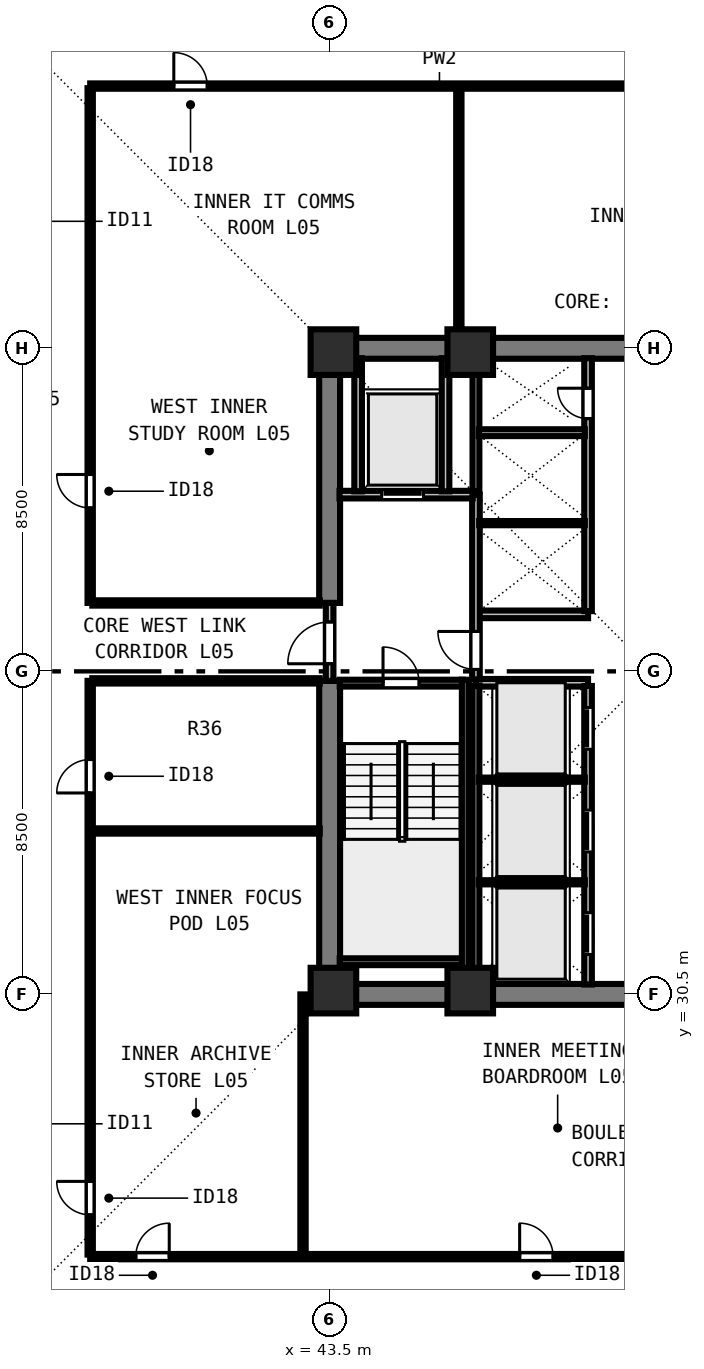
"""IFC4 building model, lengths in metres.
Left out: names, types, materials, properties, quantities, classifications, styles, units other than length and angle.
Written with IfcOpenShell. Run it as: python <this file> out.ifc"""

import sys

from ifc_helpers import new_model, si_unit, direction, frame, frame_2d, origin, origin_2d, place, context, subcontext, project, spatial, rectangle, extrude, element, fill, save


model = new_model("IFC4")
c1 = context("Model", 3, precision=1e-05, world=origin(), true_north=direction((0.0, 1.0)))
c2 = subcontext(c1, "Body", "Model", "MODEL_VIEW")
j1 = project(units=[si_unit("LENGTHUNIT", "METRE"), si_unit("PLANEANGLEUNIT", "RADIAN")], contexts=[c1])
p1 = place(None, origin())
s1 = spatial("IfcSite", under=j1, at=p1, CompositionType="ELEMENT")
p2 = place(p1, origin())
s2 = spatial("IfcBuilding", under=s1, at=p2, CompositionType="ELEMENT")
p3 = place(p2, frame((0.0, 0.0, 23.5)))
s3 = spatial("IfcBuildingStorey", under=s2, at=p3, CompositionType="ELEMENT", Elevation=23.5)
for number, where, z_axis, x_axis in (
    (1, (43.6, 30.6, 0.0), (0.0, 0.0, 1.0), (1.0, 0.0, 0.0)),
    (2, (47.2, 30.6, 0.0), (0.0, 0.0, 1.0), (1.0, 0.0, 0.0)),
    (3, (43.6, 47.4, 0.0), (0.0, 0.0, 1.0), (1.0, 0.0, 0.0)),
    (4, (47.2, 47.4, 0.0), (0.0, 0.0, 1.0), (1.0, 0.0, 0.0)),
):
    element("IfcColumn", number, at=place(p3, frame(where, z_axis=z_axis, x_axis=x_axis)), inside=s3, PredefinedType="COLUMN", context=c2, shape_type="SweptSolid", body=[
        extrude(rectangle(XDim=1.2, YDim=1.2, at=origin_2d()), origin(), (0.0, 0.0, 1.0), 3.5),
    ])
for number, where, z_axis, x_axis in (
    (5, (43.225, 30.5, 0.0), (0.0, 0.0, 1.0), (1.0, 0.0, 0.0)),
    (6, (43.225, 47.5, 0.0), (0.0, 0.0, 1.0), (1.0, 0.0, 0.0)),
):
    element("IfcWall", number, at=place(p3, frame(where, z_axis=z_axis, x_axis=x_axis)), inside=s3, PredefinedType="SHEAR", context=c2, shape_type="SweptSolid", body=[
        extrude(rectangle(XDim=17.55, YDim=0.55, at=frame_2d((8.775, 0.0))), origin(), (0.0, 0.0, 1.0), 3.28),
    ])
p4 = place(p3, frame((43.5, 30.765, 0.0), z_axis=(0.0, 0.0, 1.0), x_axis=(0.0, 1.0, 0.0)))
e7 = element("IfcWall", 7, at=p4, inside=s3, PredefinedType="SHEAR", context=c2, shape_type="SweptSolid", body=[
    extrude(rectangle(XDim=7.985, YDim=0.55, at=frame_2d((3.993, 0.0))), origin(), (0.0, 0.0, 1.0), 3.28),
])
p5 = place(p3, frame((43.5, 40.8, 0.0), z_axis=(0.0, 0.0, 1.0), x_axis=(0.0, 1.0, 0.0)))
e8 = element("IfcWall", 8, at=p5, inside=s3, PredefinedType="SHEAR", context=c2, shape_type="SweptSolid", body=[
    extrude(rectangle(XDim=6.435, YDim=0.55, at=frame_2d((3.218, 0.0))), origin(), (0.0, 0.0, 1.0), 3.28),
])
for number, where, z_axis, x_axis in (
    (9, (47.35, 38.7, 0.0), (0.0, 0.0, 1.0), (1.0, 0.0, 0.0)),
    (10, (47.35, 40.5, 0.0), (0.0, 0.0, 1.0), (1.0, 0.0, 0.0)),
):
    element("IfcWall", number, at=place(p3, frame(where, z_axis=z_axis, x_axis=x_axis)), inside=s3, PredefinedType="SOLIDWALL", context=c2, shape_type="SweptSolid", body=[
        extrude(rectangle(XDim=2.95, YDim=0.2, at=frame_2d((1.475, 0.0))), origin(), (0.0, 0.0, 1.0), 3.28),
    ])
p6 = place(p3, frame((50.3, 30.76, 0.0), z_axis=(0.0, 0.0, 1.0), x_axis=(0.0, 1.0, 0.0)))
e11 = element("IfcWall", 11, at=p6, inside=s3, PredefinedType="SOLIDWALL", context=c2, shape_type="SweptSolid", body=[
    extrude(rectangle(XDim=7.855, YDim=0.2, at=frame_2d((3.927, 0.0))), origin(), (0.0, 0.0, 1.0), 3.28),
])
p7 = place(p6, frame((0.79, 0.0, 0.0)))
e12 = element("IfcOpeningElement", 12, at=p7, cuts=e11, PredefinedType="OPENING", context=c2, shape_type="SweptSolid", body=[
    extrude(rectangle(XDim=1.1, YDim=2.2, at=frame_2d((0.55, 1.1))), frame((0.0, 0.11, 0.0), z_axis=(0.0, -1.0, 0.0), x_axis=(1.0, 0.0, 0.0)), (0.0, 0.0, 1.0), 0.22),
])
p8 = place(p6, frame((3.49, 0.0, 0.0)))
e13 = element("IfcOpeningElement", 13, at=p8, cuts=e11, PredefinedType="OPENING", context=c2, shape_type="SweptSolid", body=[
    extrude(rectangle(XDim=1.1, YDim=2.2, at=frame_2d((0.55, 1.1))), frame((0.0, 0.11, 0.0), z_axis=(0.0, -1.0, 0.0), x_axis=(1.0, 0.0, 0.0)), (0.0, 0.0, 1.0), 0.22),
])
p9 = place(p6, frame((6.19, 0.0, 0.0)))
e14 = element("IfcOpeningElement", 14, at=p9, cuts=e11, PredefinedType="OPENING", context=c2, shape_type="SweptSolid", body=[
    extrude(rectangle(XDim=1.1, YDim=2.2, at=frame_2d((0.55, 1.1))), frame((0.0, 0.11, 0.0), z_axis=(0.0, -1.0, 0.0), x_axis=(1.0, 0.0, 0.0)), (0.0, 0.0, 1.0), 0.22),
])
p10 = place(p3, frame((50.3, 40.585, 0.0), z_axis=(0.0, 0.0, 1.0), x_axis=(0.0, 1.0, 0.0)))
e15 = element("IfcWall", 15, at=p10, inside=s3, PredefinedType="SOLIDWALL", context=c2, shape_type="SweptSolid", body=[
    extrude(rectangle(XDim=6.655, YDim=0.2, at=frame_2d((3.328, 0.0))), origin(), (0.0, 0.0, 1.0), 3.28),
])
p11 = place(p10, frame((5.065, 0.0, 0.0)))
e16 = element("IfcOpeningElement", 16, at=p11, cuts=e15, PredefinedType="OPENING", context=c2, shape_type="SweptSolid", body=[
    extrude(rectangle(XDim=0.8, YDim=2.08, at=frame_2d((0.4, 1.04))), frame((0.0, 0.11, 0.0), z_axis=(0.0, -1.0, 0.0), x_axis=(1.0, 0.0, 0.0)), (0.0, 0.0, 1.0), 0.22),
])
p12 = place(p3, frame((43.5, 38.75, 0.0), z_axis=(0.0, 0.0, 1.0), x_axis=(0.0, 1.0, 0.0)))
e17 = element("IfcWall", 17, at=p12, inside=s3, PredefinedType="SOLIDWALL", context=c2, shape_type="SweptSolid", body=[
    extrude(rectangle(XDim=2.05, YDim=0.2, at=frame_2d((1.025, 0.0))), origin(), (0.0, 0.0, 1.0), 3.28),
])
p13 = place(p12, frame((0.45, 0.0, 0.0)))
e18 = element("IfcOpeningElement", 18, at=p13, cuts=e17, PredefinedType="OPENING", context=c2, shape_type="SweptSolid", body=[
    extrude(rectangle(XDim=1.1, YDim=2.15, at=frame_2d((0.55, 1.075))), frame((0.0, 0.11, 0.0), z_axis=(0.0, -1.0, 0.0), x_axis=(1.0, 0.0, 0.0)), (0.0, 0.0, 1.0), 0.22),
])
p14 = place(p3, frame((47.35, 38.785, 0.0), z_axis=(0.0, 0.0, 1.0), x_axis=(0.0, 1.0, 0.0)))
e19 = element("IfcWall", 19, at=p14, inside=s3, PredefinedType="SOLIDWALL", context=c2, shape_type="SweptSolid", body=[
    extrude(rectangle(XDim=4.865, YDim=0.2, at=frame_2d((2.433, 0.0))), origin(), (0.0, 0.0, 1.0), 3.28),
])
p15 = place(p14, frame((0.265, 0.0, 0.0)))
e20 = element("IfcOpeningElement", 20, at=p15, cuts=e19, PredefinedType="OPENING", context=c2, shape_type="SweptSolid", body=[
    extrude(rectangle(XDim=1.0, YDim=2.15, at=frame_2d((0.5, 1.075))), frame((0.0, 0.11, 0.0), z_axis=(0.0, -1.0, 0.0), x_axis=(1.0, 0.0, 0.0)), (0.0, 0.0, 1.0), 0.22),
])
p16 = place(p3, frame((43.76, 43.65, 0.0), z_axis=(0.0, 0.0, 1.0), x_axis=(1.0, 0.0, 0.0)))
e21 = element("IfcWall", 21, at=p16, inside=s3, PredefinedType="SOLIDWALL", context=c2, shape_type="SweptSolid", body=[
    extrude(rectangle(XDim=3.505, YDim=0.2, at=frame_2d((1.752, 0.0))), origin(), (0.0, 0.0, 1.0), 3.28),
])
p17 = place(p16, frame((1.11, 0.0, 0.0)))
e22 = element("IfcOpeningElement", 22, at=p17, cuts=e21, PredefinedType="OPENING", context=c2, shape_type="SweptSolid", body=[
    extrude(rectangle(XDim=1.1, YDim=2.2, at=frame_2d((0.55, 1.1))), frame((0.0, 0.11, 0.0), z_axis=(0.0, -1.0, 0.0), x_axis=(1.0, 0.0, 0.0)), (0.0, 0.0, 1.0), 0.22),
])
for number, where, z_axis, x_axis in (
    (23, (46.55, 43.735, 0.0), (0.0, 0.0, 1.0), (0.0, 1.0, 0.0)),
    (24, (44.25, 43.735, 0.0), (0.0, 0.0, 1.0), (0.0, 1.0, 0.0)),
):
    element("IfcWall", number, at=place(p3, frame(where, z_axis=z_axis, x_axis=x_axis)), inside=s3, PredefinedType="SOLIDWALL", context=c2, shape_type="SweptSolid", body=[
        extrude(rectangle(XDim=3.505, YDim=0.2, at=frame_2d((1.752, 0.0))), origin(), (0.0, 0.0, 1.0), 3.28),
    ])
p18 = place(p3, frame((47.35, 30.76, 0.0), z_axis=(0.0, 0.0, 1.0), x_axis=(0.0, 1.0, 0.0)))
e25 = element("IfcWall", 25, at=p18, inside=s3, PredefinedType="SOLIDWALL", context=c2, shape_type="SweptSolid", body=[
    extrude(rectangle(XDim=7.855, YDim=0.18, at=frame_2d((3.927, 0.0))), origin(), (0.0, 0.0, 1.0), 3.28),
])
for number, where, z_axis, x_axis in (
    (26, (47.425, 33.45, 0.0), (0.0, 0.0, 1.0), (1.0, 0.0, 0.0)),
    (27, (47.425, 36.15, 0.0), (0.0, 0.0, 1.0), (1.0, 0.0, 0.0)),
):
    element("IfcWall", number, at=place(p3, frame(where, z_axis=z_axis, x_axis=x_axis)), inside=s3, PredefinedType="PARTITIONING", context=c2, shape_type="SweptSolid", body=[
        extrude(rectangle(XDim=2.79, YDim=0.11, at=frame_2d((1.395, 0.0))), origin(), (0.0, 0.0, 1.0), 3.28),
    ])
p19 = place(p3, frame((47.35, 43.735, 0.0), z_axis=(0.0, 0.0, 1.0), x_axis=(0.0, 1.0, 0.0)))
e28 = element("IfcWall", 28, at=p19, inside=s3, PredefinedType="SOLIDWALL", context=c2, shape_type="SweptSolid", body=[
    extrude(rectangle(XDim=3.505, YDim=0.18, at=frame_2d((1.752, 0.0))), origin(), (0.0, 0.0, 1.0), 3.28),
])
p20 = place(p3, frame((47.435, 42.9, 0.0), z_axis=(0.0, 0.0, 1.0), x_axis=(1.0, 0.0, 0.0)))
e29 = element("IfcWall", 29, at=p20, inside=s3, PredefinedType="PARTITIONING", context=c2, shape_type="SweptSolid", body=[
    extrude(rectangle(XDim=2.78, YDim=0.11, at=frame_2d((1.39, 0.0))), origin(), (0.0, 0.0, 1.0), 3.28),
])
p21 = place(p3, frame((47.425, 45.28, 0.0), z_axis=(0.0, 0.0, 1.0), x_axis=(1.0, 0.0, 0.0)))
e30 = element("IfcWall", 30, at=p21, inside=s3, PredefinedType="SOLIDWALL", context=c2, shape_type="SweptSolid", body=[
    extrude(rectangle(XDim=2.79, YDim=0.18, at=frame_2d((1.395, 0.0))), origin(), (0.0, 0.0, 1.0), 3.28),
])
p22 = place(p3, frame((37.2, 23.6, 0.0), z_axis=(0.0, 0.0, 1.0), x_axis=(1.0, 0.0, 0.0)))
e31 = element("IfcWall", 31, at=p22, inside=s3, PredefinedType="PARTITIONING", context=c2, shape_type="SweptSolid", body=[
    extrude(rectangle(XDim=29.6, YDim=0.14, at=frame_2d((14.8, 0.0))), origin(), (0.0, 0.0, 1.0), 3.28),
])
p23 = place(p22, frame((1.2, 0.0, 0.0)))
e32 = element("IfcOpeningElement", 32, at=p23, cuts=e31, PredefinedType="OPENING", context=c2, shape_type="SweptSolid", body=[
    extrude(rectangle(XDim=0.88, YDim=2.1, at=frame_2d((0.44, 1.05))), frame((0.0, 0.08, 0.0), z_axis=(0.0, -1.0, 0.0), x_axis=(1.0, 0.0, 0.0)), (0.0, 0.0, 1.0), 0.16),
])
p24 = place(p22, frame((11.3, 0.0, 0.0)))
e33 = element("IfcOpeningElement", 33, at=p24, cuts=e31, PredefinedType="OPENING", context=c2, shape_type="SweptSolid", body=[
    extrude(rectangle(XDim=0.88, YDim=2.1, at=frame_2d((0.44, 1.05))), frame((0.0, 0.08, 0.0), z_axis=(0.0, -1.0, 0.0), x_axis=(1.0, 0.0, 0.0)), (0.0, 0.0, 1.0), 0.16),
])
p25 = place(p22, frame((21.8, 0.0, 0.0)))
e34 = element("IfcOpeningElement", 34, at=p25, cuts=e31, PredefinedType="OPENING", context=c2, shape_type="SweptSolid", body=[
    extrude(rectangle(XDim=0.88, YDim=2.1, at=frame_2d((0.44, 1.05))), frame((0.0, 0.08, 0.0), z_axis=(0.0, -1.0, 0.0), x_axis=(1.0, 0.0, 0.0)), (0.0, 0.0, 1.0), 0.16),
])
p26 = place(p3, frame((37.2, 54.4, 0.0), z_axis=(0.0, 0.0, 1.0), x_axis=(1.0, 0.0, 0.0)))
e35 = element("IfcWall", 35, at=p26, inside=s3, PredefinedType="PARTITIONING", context=c2, shape_type="SweptSolid", body=[
    extrude(rectangle(XDim=29.6, YDim=0.14, at=frame_2d((14.8, 0.0))), origin(), (0.0, 0.0, 1.0), 3.28),
])
p27 = place(p26, frame((2.2, 0.0, 0.0)))
e36 = element("IfcOpeningElement", 36, at=p27, cuts=e35, PredefinedType="OPENING", context=c2, shape_type="SweptSolid", body=[
    extrude(rectangle(XDim=0.88, YDim=2.1, at=frame_2d((0.44, 1.05))), frame((0.0, 0.08, 0.0), z_axis=(0.0, -1.0, 0.0), x_axis=(1.0, 0.0, 0.0)), (0.0, 0.0, 1.0), 0.16),
])
p28 = place(p26, frame((15.3, 0.0, 0.0)))
e37 = element("IfcOpeningElement", 37, at=p28, cuts=e35, PredefinedType="OPENING", context=c2, shape_type="SweptSolid", body=[
    extrude(rectangle(XDim=0.88, YDim=2.1, at=frame_2d((0.44, 1.05))), frame((0.0, 0.08, 0.0), z_axis=(0.0, -1.0, 0.0), x_axis=(1.0, 0.0, 0.0)), (0.0, 0.0, 1.0), 0.16),
])
p29 = place(p26, frame((24.8, 0.0, 0.0)))
e38 = element("IfcOpeningElement", 38, at=p29, cuts=e35, PredefinedType="OPENING", context=c2, shape_type="SweptSolid", body=[
    extrude(rectangle(XDim=0.88, YDim=2.1, at=frame_2d((0.44, 1.05))), frame((0.0, 0.08, 0.0), z_axis=(0.0, -1.0, 0.0), x_axis=(1.0, 0.0, 0.0)), (0.0, 0.0, 1.0), 0.16),
])
p30 = place(p3, frame((37.2, 23.655, 0.0), z_axis=(0.0, 0.0, 1.0), x_axis=(0.0, 1.0, 0.0)))
e39 = element("IfcWall", 39, at=p30, inside=s3, PredefinedType="PARTITIONING", context=c2, shape_type="SweptSolid", body=[
    extrude(rectangle(XDim=15.095, YDim=0.14, at=frame_2d((7.547, 0.0))), origin(), (0.0, 0.0, 1.0), 3.28),
])
p31 = place(p30, frame((1.045, 0.0, 0.0)))
e40 = element("IfcOpeningElement", 40, at=p31, cuts=e39, PredefinedType="OPENING", context=c2, shape_type="SweptSolid", body=[
    extrude(rectangle(XDim=0.88, YDim=2.1, at=frame_2d((0.44, 1.05))), frame((0.0, 0.08, 0.0), z_axis=(0.0, -1.0, 0.0), x_axis=(1.0, 0.0, 0.0)), (0.0, 0.0, 1.0), 0.16),
])
p32 = place(p30, frame((12.145, 0.0, 0.0)))
e41 = element("IfcOpeningElement", 41, at=p32, cuts=e39, PredefinedType="OPENING", context=c2, shape_type="SweptSolid", body=[
    extrude(rectangle(XDim=0.88, YDim=2.1, at=frame_2d((0.44, 1.05))), frame((0.0, 0.08, 0.0), z_axis=(0.0, -1.0, 0.0), x_axis=(1.0, 0.0, 0.0)), (0.0, 0.0, 1.0), 0.16),
])
p33 = place(p3, frame((37.2, 40.8, 0.0), z_axis=(0.0, 0.0, 1.0), x_axis=(0.0, 1.0, 0.0)))
e42 = element("IfcWall", 42, at=p33, inside=s3, PredefinedType="PARTITIONING", context=c2, shape_type="SweptSolid", body=[
    extrude(rectangle(XDim=13.545, YDim=0.14, at=frame_2d((6.772, 0.0))), origin(), (0.0, 0.0, 1.0), 3.28),
])
p34 = place(p33, frame((2.5, 0.0, 0.0)))
e43 = element("IfcOpeningElement", 43, at=p34, cuts=e42, PredefinedType="OPENING", context=c2, shape_type="SweptSolid", body=[
    extrude(rectangle(XDim=0.88, YDim=2.1, at=frame_2d((0.44, 1.05))), frame((0.0, 0.08, 0.0), z_axis=(0.0, -1.0, 0.0), x_axis=(1.0, 0.0, 0.0)), (0.0, 0.0, 1.0), 0.16),
])
for number, where, z_axis, x_axis in (
    (44, (37.255, 38.75, 0.0), (0.0, 0.0, 1.0), (1.0, 0.0, 0.0)),
    (45, (37.255, 40.8, 0.0), (0.0, 0.0, 1.0), (1.0, 0.0, 0.0)),
):
    element("IfcWall", number, at=place(p3, frame(where, z_axis=z_axis, x_axis=x_axis)), inside=s3, PredefinedType="PARTITIONING", context=c2, shape_type="SweptSolid", body=[
        extrude(rectangle(XDim=5.985, YDim=0.14, at=frame_2d((2.993, 0.0))), origin(), (0.0, 0.0, 1.0), 3.28),
    ])
p35 = place(p3, frame((42.8, 23.655, 0.0), z_axis=(0.0, 0.0, 1.0), x_axis=(0.0, 1.0, 0.0)))
e46 = element("IfcWall", 46, at=p35, inside=s3, PredefinedType="PARTITIONING", context=c2, shape_type="SweptSolid", body=[
    extrude(rectangle(XDim=6.845, YDim=0.14, at=frame_2d((3.422, 0.0))), origin(), (0.0, 0.0, 1.0), 2.439),
])
p36 = place(p3, frame((46.9, 47.76, 0.0), z_axis=(0.0, 0.0, 1.0), x_axis=(0.0, 1.0, 0.0)))
e47 = element("IfcWall", 47, at=p36, inside=s3, PredefinedType="PARTITIONING", context=c2, shape_type="SweptSolid", body=[
    extrude(rectangle(XDim=6.585, YDim=0.14, at=frame_2d((3.292, 0.0))), origin(), (0.0, 0.0, 1.0), 3.28),
])
p37 = place(p3, frame((37.255, 34.8, 0.0), z_axis=(0.0, 0.0, 1.0), x_axis=(1.0, 0.0, 0.0)))
e48 = element("IfcWall", 48, at=p37, inside=s3, PredefinedType="PARTITIONING", context=c2, shape_type="SweptSolid", body=[
    extrude(rectangle(XDim=5.985, YDim=0.14, at=frame_2d((2.993, 0.0))), origin(), (0.0, 0.0, 1.0), 3.28),
])
p38 = place(p3, frame((43.765, 38.69, 0.0), z_axis=(0.0, 0.0, 1.0), x_axis=(1.0, 0.0, 0.0)))
e49 = element("IfcWall", 49, at=p38, inside=s3, PredefinedType="SOLIDWALL", context=c2, shape_type="SweptSolid", body=[
    extrude(rectangle(XDim=3.23, YDim=0.18, at=frame_2d((1.615, 0.0))), origin(), (0.0, 0.0, 1.0), 3.28),
])
p39 = place(p38, frame((1.14, 0.0, 0.0)))
e50 = element("IfcOpeningElement", 50, at=p39, cuts=e49, PredefinedType="OPENING", context=c2, shape_type="SweptSolid", body=[
    extrude(rectangle(XDim=0.95, YDim=2.15, at=frame_2d((0.475, 1.075))), frame((0.0, 0.1, 0.0), z_axis=(0.0, -1.0, 0.0), x_axis=(1.0, 0.0, 0.0)), (0.0, 0.0, 1.0), 0.2),
])
p40 = place(p3, frame((43.765, 31.36, 0.0), z_axis=(0.0, 0.0, 1.0), x_axis=(1.0, 0.0, 0.0)))
e51 = element("IfcWall", 51, at=p40, inside=s3, PredefinedType="SOLIDWALL", context=c2, shape_type="SweptSolid", body=[
    extrude(rectangle(XDim=3.23, YDim=0.18, at=frame_2d((1.615, 0.0))), origin(), (0.0, 0.0, 1.0), 3.28),
])
p41 = place(p3, frame((47.07, 38.78, 0.0), z_axis=(0.0, 0.0, 1.0), x_axis=(0.0, -1.0, 0.0)))
e52 = element("IfcWall", 52, at=p41, inside=s3, PredefinedType="SOLIDWALL", context=c2, shape_type="SweptSolid", body=[
    extrude(rectangle(XDim=8.017, YDim=0.18, at=frame_2d((4.009, 0.0))), origin(), (0.0, 0.0, 1.0), 3.28),
])
p42 = place(p13, origin())
e53 = element("IfcDoor", 53, at=p42, inside=s3, OperationType="SINGLE_SWING_LEFT", PredefinedType="DOOR", context=c2, shape_type="SweptSolid", body=[
    extrude(rectangle(XDim=1.1, YDim=2.15, at=frame_2d((0.55, 1.075))), frame((0.0, 0.025, 0.0), z_axis=(0.0, -1.0, 0.0), x_axis=(1.0, 0.0, 0.0)), (0.0, 0.0, 1.0), 0.05),
])
fill(e18, e53)
p43 = place(p15, origin())
e54 = element("IfcDoor", 54, at=p43, inside=s3, OperationType="SINGLE_SWING_RIGHT", PredefinedType="DOOR", context=c2, shape_type="SweptSolid", body=[
    extrude(rectangle(XDim=1.0, YDim=2.15, at=frame_2d((0.5, 1.075))), frame((0.0, 0.025, 0.0), z_axis=(0.0, -1.0, 0.0), x_axis=(1.0, 0.0, 0.0)), (0.0, 0.0, 1.0), 0.05),
])
fill(e20, e54)
p44 = place(p17, origin())
e55 = element("IfcDoor", 55, at=p44, inside=s3, OperationType="SLIDING_TO_LEFT", PredefinedType="DOOR", context=c2, shape_type="SweptSolid", body=[
    extrude(rectangle(XDim=1.1, YDim=2.2, at=frame_2d((0.55, 1.1))), frame((0.0, 0.025, 0.0), z_axis=(0.0, -1.0, 0.0), x_axis=(1.0, 0.0, 0.0)), (0.0, 0.0, 1.0), 0.05),
])
fill(e22, e55)
p45 = place(p7, origin())
e56 = element("IfcDoor", 56, at=p45, inside=s3, OperationType="SLIDING_TO_LEFT", PredefinedType="DOOR", context=c2, shape_type="SweptSolid", body=[
    extrude(rectangle(XDim=1.1, YDim=2.2, at=frame_2d((0.55, 1.1))), frame((0.0, 0.025, 0.0), z_axis=(0.0, -1.0, 0.0), x_axis=(1.0, 0.0, 0.0)), (0.0, 0.0, 1.0), 0.05),
])
fill(e12, e56)
p46 = place(p8, origin())
e57 = element("IfcDoor", 57, at=p46, inside=s3, OperationType="SLIDING_TO_LEFT", PredefinedType="DOOR", context=c2, shape_type="SweptSolid", body=[
    extrude(rectangle(XDim=1.1, YDim=2.2, at=frame_2d((0.55, 1.1))), frame((0.0, 0.025, 0.0), z_axis=(0.0, -1.0, 0.0), x_axis=(1.0, 0.0, 0.0)), (0.0, 0.0, 1.0), 0.05),
])
fill(e13, e57)
p47 = place(p9, origin())
e58 = element("IfcDoor", 58, at=p47, inside=s3, OperationType="SLIDING_TO_LEFT", PredefinedType="DOOR", context=c2, shape_type="SweptSolid", body=[
    extrude(rectangle(XDim=1.1, YDim=2.2, at=frame_2d((0.55, 1.1))), frame((0.0, 0.025, 0.0), z_axis=(0.0, -1.0, 0.0), x_axis=(1.0, 0.0, 0.0)), (0.0, 0.0, 1.0), 0.05),
])
fill(e14, e58)
p48 = place(p11, origin())
e59 = element("IfcDoor", 59, at=p48, inside=s3, OperationType="SINGLE_SWING_RIGHT", PredefinedType="DOOR", context=c2, shape_type="SweptSolid", body=[
    extrude(rectangle(XDim=0.8, YDim=2.08, at=frame_2d((0.4, 1.04))), frame((0.0, 0.025, 0.0), z_axis=(0.0, -1.0, 0.0), x_axis=(1.0, 0.0, 0.0)), (0.0, 0.0, 1.0), 0.05),
])
fill(e16, e59)
p49 = place(p23, origin())
e60 = element("IfcDoor", 60, at=p49, inside=s3, OperationType="SINGLE_SWING_RIGHT", PredefinedType="DOOR", context=c2, shape_type="SweptSolid", body=[
    extrude(rectangle(XDim=0.88, YDim=2.1, at=frame_2d((0.44, 1.05))), frame((0.0, 0.025, 0.0), z_axis=(0.0, -1.0, 0.0), x_axis=(1.0, 0.0, 0.0)), (0.0, 0.0, 1.0), 0.05),
])
fill(e32, e60)
p50 = place(p24, origin())
e61 = element("IfcDoor", 61, at=p50, inside=s3, OperationType="SINGLE_SWING_LEFT", PredefinedType="DOOR", context=c2, shape_type="SweptSolid", body=[
    extrude(rectangle(XDim=0.88, YDim=2.1, at=frame_2d((0.44, 1.05))), frame((0.0, 0.025, 0.0), z_axis=(0.0, -1.0, 0.0), x_axis=(1.0, 0.0, 0.0)), (0.0, 0.0, 1.0), 0.05),
])
fill(e33, e61)
p51 = place(p27, origin())
e62 = element("IfcDoor", 62, at=p51, inside=s3, OperationType="SINGLE_SWING_LEFT", PredefinedType="DOOR", context=c2, shape_type="SweptSolid", body=[
    extrude(rectangle(XDim=0.88, YDim=2.1, at=frame_2d((0.44, 1.05))), frame((0.0, 0.025, 0.0), z_axis=(0.0, -1.0, 0.0), x_axis=(1.0, 0.0, 0.0)), (0.0, 0.0, 1.0), 0.05),
])
fill(e36, e62)
p52 = place(p31, origin())
e63 = element("IfcDoor", 63, at=p52, inside=s3, OperationType="SINGLE_SWING_RIGHT", PredefinedType="DOOR", context=c2, shape_type="SweptSolid", body=[
    extrude(rectangle(XDim=0.88, YDim=2.1, at=frame_2d((0.44, 1.05))), frame((0.0, 0.025, 0.0), z_axis=(0.0, -1.0, 0.0), x_axis=(1.0, 0.0, 0.0)), (0.0, 0.0, 1.0), 0.05),
])
fill(e40, e63)
p53 = place(p32, origin())
e64 = element("IfcDoor", 64, at=p53, inside=s3, OperationType="SINGLE_SWING_LEFT", PredefinedType="DOOR", context=c2, shape_type="SweptSolid", body=[
    extrude(rectangle(XDim=0.88, YDim=2.1, at=frame_2d((0.44, 1.05))), frame((0.0, 0.025, 0.0), z_axis=(0.0, -1.0, 0.0), x_axis=(1.0, 0.0, 0.0)), (0.0, 0.0, 1.0), 0.05),
])
fill(e41, e64)
p54 = place(p34, origin())
e65 = element("IfcDoor", 65, at=p54, inside=s3, OperationType="SINGLE_SWING_RIGHT", PredefinedType="DOOR", context=c2, shape_type="SweptSolid", body=[
    extrude(rectangle(XDim=0.88, YDim=2.1, at=frame_2d((0.44, 1.05))), frame((0.0, 0.025, 0.0), z_axis=(0.0, -1.0, 0.0), x_axis=(1.0, 0.0, 0.0)), (0.0, 0.0, 1.0), 0.05),
])
fill(e43, e65)
p55 = place(p39, origin())
e66 = element("IfcDoor", 66, at=p55, inside=s3, OperationType="SINGLE_SWING_LEFT", PredefinedType="DOOR", context=c2, shape_type="SweptSolid", body=[
    extrude(rectangle(XDim=0.95, YDim=2.15, at=frame_2d((0.475, 1.075))), frame((0.0, 0.025, 0.0), z_axis=(0.0, -1.0, 0.0), x_axis=(1.0, 0.0, 0.0)), (0.0, 0.0, 1.0), 0.05),
])
fill(e50, e66)
save(model, sys.argv[1])
